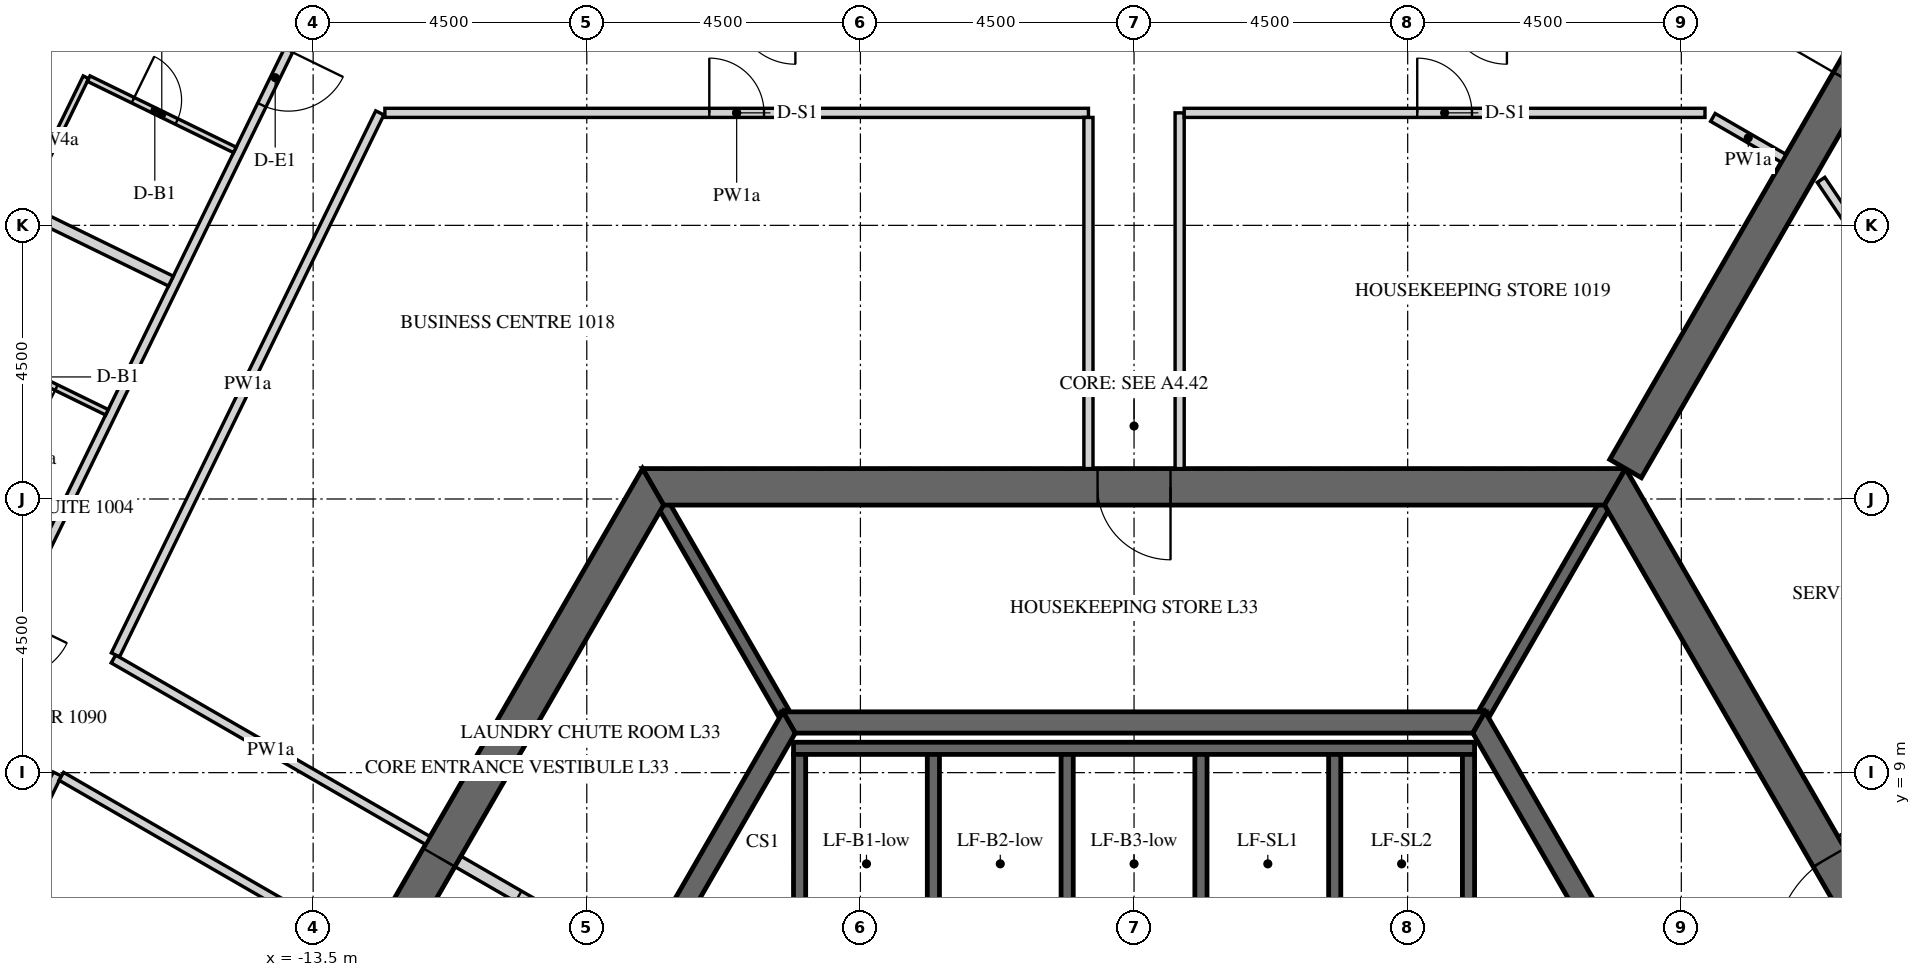
"""IFC4 building model, lengths in metres.
Left out: names, types, materials, properties, quantities, classifications, styles, units other than length and angle.
Written with IfcOpenShell. Run it as: python <this file> out.ifc"""

import sys

from ifc_helpers import new_model, si_unit, direction, frame, frame_2d, origin, place, context, subcontext, project, spatial, polyline, rectangle, outline, extrude, element, fill, save


model = new_model("IFC4")
c1 = context("Model", 3, precision=1e-05, world=origin(), true_north=direction((0.0, 1.0)))
c2 = subcontext(c1, "Body", "Model", "MODEL_VIEW")
j1 = project(units=[si_unit("LENGTHUNIT", "METRE"), si_unit("PLANEANGLEUNIT", "RADIAN")], contexts=[c1])
p1 = place(None, origin())
s1 = spatial("IfcSite", under=j1, at=p1, CompositionType="ELEMENT")
p2 = place(p1, origin())
s2 = spatial("IfcBuilding", under=s1, at=p2, CompositionType="ELEMENT")
p3 = place(p2, frame((0.0, 0.0, 142.8)))
s3 = spatial("IfcBuildingStorey", under=s2, at=p3, CompositionType="ELEMENT", Elevation=142.8)
p4 = place(p3, frame((-7.91, 13.7, -0.15), z_axis=(0.0, 0.0, 1.0), x_axis=(-0.499999880136, -0.866025472988, 0.0)))
e1 = element("IfcWall", 1, at=p4, inside=s3, PredefinedType="SHEAR", context=c2, shape_type="SweptSolid", body=[
    extrude(outline(polyline([(-0.173, -0.3), (15.993, -0.3), (15.646, 0.3), (0.173, 0.3), (-0.173, -0.3)])), origin(), (0.0, 0.0, 1.0), 3.75),
])
p5 = place(p4, frame((7.039, 0.0, 0.15)))
e2 = element("IfcOpeningElement", 2, at=p5, cuts=e1, PredefinedType="OPENING", context=c2, shape_type="SweptSolid", body=[
    extrude(rectangle(XDim=1.8, YDim=2.4, at=frame_2d((0.9, 1.2))), frame((0.0, 0.31, 0.0), z_axis=(0.0, -1.0, 0.0), x_axis=(1.0, 0.0, 0.0)), (0.0, 0.0, 1.0), 0.62),
])
p6 = place(p3, frame((15.819, 0.0, -0.15), z_axis=(0.0, 0.0, 1.0), x_axis=(-0.499999880136, 0.866025472988, 0.0)))
e3 = element("IfcWall", 3, at=p6, inside=s3, PredefinedType="SHEAR", context=c2, shape_type="SweptSolid", body=[
    extrude(outline(polyline([(-0.173, -0.3), (15.993, -0.3), (15.646, 0.3), (0.173, 0.3), (-0.173, -0.3)])), origin(), (0.0, 0.0, 1.0), 3.75),
])
p7 = place(p6, frame((6.981, 0.0, 0.15)))
e4 = element("IfcOpeningElement", 4, at=p7, cuts=e3, PredefinedType="OPENING", context=c2, shape_type="SweptSolid", body=[
    extrude(rectangle(XDim=1.8, YDim=2.4, at=frame_2d((0.9, 1.2))), frame((0.0, 0.31, 0.0), z_axis=(0.0, -1.0, 0.0), x_axis=(1.0, 0.0, 0.0)), (0.0, 0.0, 1.0), 0.62),
])
p8 = place(p3, frame((7.91, 13.7, -0.15), z_axis=(0.0, 0.0, 1.0), x_axis=(-1.0, 0.0, 0.0)))
e5 = element("IfcWall", 5, at=p8, inside=s3, PredefinedType="SHEAR", context=c2, shape_type="SweptSolid", body=[
    extrude(outline(polyline([(-0.173, -0.3), (15.993, -0.3), (15.646, 0.3), (0.173, 0.3), (-0.173, -0.3)])), origin(), (0.0, 0.0, 1.0), 3.75),
])
p9 = place(p8, frame((7.31, 0.0, 0.15)))
e6 = element("IfcOpeningElement", 6, at=p9, cuts=e5, PredefinedType="OPENING", context=c2, shape_type="SweptSolid", body=[
    extrude(rectangle(XDim=1.2, YDim=2.4, at=frame_2d((0.6, 1.2))), frame((0.0, 0.31, 0.0), z_axis=(0.0, -1.0, 0.0), x_axis=(1.0, 0.0, 0.0)), (0.0, 0.0, 1.0), 0.62),
])
p10 = place(p3, frame((8.083, 14.0, -0.15), z_axis=(0.0, 0.0, 1.0), x_axis=(0.499997680643, 0.866026742862, 0.0)))
e7 = element("IfcWall", 7, at=p10, inside=s3, PredefinedType="SHEAR", context=c2, shape_type="SweptSolid", body=[
    extrude(rectangle(XDim=16.509, YDim=0.6, at=frame_2d((8.254, 0.0))), origin(), (0.0, 0.0, 1.0), 3.75),
])
p11 = place(p10, frame((7.354, 0.0, 0.15)))
e8 = element("IfcOpeningElement", 8, at=p11, cuts=e7, PredefinedType="OPENING", context=c2, shape_type="SweptSolid", body=[
    extrude(rectangle(XDim=1.8, YDim=2.4, at=frame_2d((0.9, 1.2))), frame((0.0, 0.31, 0.0), z_axis=(0.0, -1.0, 0.0), x_axis=(1.0, 0.0, 0.0)), (0.0, 0.0, 1.0), 0.62),
])
p12 = place(p3, frame((-5.673, 9.825, -0.15), z_axis=(0.0, 0.0, 1.0), x_axis=(-0.499995046907, -0.866028263435, 0.0)))
e9 = element("IfcWall", 9, at=p12, inside=s3, PredefinedType="SHEAR", context=c2, shape_type="SweptSolid", body=[
    extrude(outline(polyline([(-0.101, -0.175), (11.446, -0.175), (11.244, 0.175), (0.101, 0.175), (-0.101, -0.175)])), origin(), (0.0, 0.0, 1.0), 3.75),
])
p13 = place(p12, frame((4.801, 0.0, 0.15)))
e10 = element("IfcOpeningElement", 10, at=p13, cuts=e9, PredefinedType="OPENING", context=c2, shape_type="SweptSolid", body=[
    extrude(rectangle(XDim=1.8, YDim=2.4, at=frame_2d((0.9, 1.2))), frame((0.0, 0.185, 0.0), z_axis=(0.0, -1.0, 0.0), x_axis=(1.0, 0.0, 0.0)), (0.0, 0.0, 1.0), 0.37),
])
p14 = place(p3, frame((11.345, 0.0, -0.15), z_axis=(0.0, 0.0, 1.0), x_axis=(-0.499995046907, 0.866028263435, 0.0)))
e11 = element("IfcWall", 11, at=p14, inside=s3, PredefinedType="SHEAR", context=c2, shape_type="SweptSolid", body=[
    extrude(outline(polyline([(-0.101, -0.175), (11.446, -0.175), (11.244, 0.175), (0.101, 0.175), (-0.101, -0.175)])), origin(), (0.0, 0.0, 1.0), 3.75),
])
p15 = place(p14, frame((4.744, 0.0, 0.15)))
e12 = element("IfcOpeningElement", 12, at=p15, cuts=e11, PredefinedType="OPENING", context=c2, shape_type="SweptSolid", body=[
    extrude(rectangle(XDim=1.8, YDim=2.4, at=frame_2d((0.9, 1.2))), frame((0.0, 0.185, 0.0), z_axis=(0.0, -1.0, 0.0), x_axis=(1.0, 0.0, 0.0)), (0.0, 0.0, 1.0), 0.37),
])
p16 = place(p3, frame((5.673, 9.825, -0.15), z_axis=(0.0, 0.0, 1.0), x_axis=(-1.0, 0.0, 0.0)))
e13 = element("IfcWall", 13, at=p16, inside=s3, PredefinedType="SHEAR", context=c2, shape_type="SweptSolid", body=[
    extrude(outline(polyline([(-0.101, -0.175), (11.446, -0.175), (11.244, 0.175), (0.101, 0.175), (-0.101, -0.175)])), origin(), (0.0, 0.0, 1.0), 3.75),
])
p17 = place(p3, frame((-5.6, 9.4, -0.25), z_axis=(0.0, 0.0, 1.0), x_axis=(1.0, 0.0, 0.0)))
e14 = element("IfcWall", 14, at=p17, inside=s3, PredefinedType="SHEAR", context=c2, shape_type="SweptSolid", body=[
    extrude(rectangle(XDim=11.2, YDim=0.2, at=frame_2d((5.6, 0.0))), origin(), (0.0, 0.0, 1.0), 3.9),
])
for number, where, z_axis, x_axis in (
    (15, (-5.5, 6.4, -0.25), (0.0, 0.0, 1.0), (0.0, 1.0, 0.0)),
    (16, (-3.3, 6.4, -0.25), (0.0, 0.0, 1.0), (0.0, 1.0, 0.0)),
    (17, (-1.1, 6.4, -0.25), (0.0, 0.0, 1.0), (0.0, 1.0, 0.0)),
    (18, (1.1, 6.4, -0.25), (0.0, 0.0, 1.0), (0.0, 1.0, 0.0)),
    (19, (3.3, 6.4, -0.25), (0.0, 0.0, 1.0), (0.0, 1.0, 0.0)),
    (20, (5.5, 6.4, -0.25), (0.0, 0.0, 1.0), (0.0, 1.0, 0.0)),
):
    element("IfcWall", number, at=place(p3, frame(where, z_axis=z_axis, x_axis=x_axis)), inside=s3, PredefinedType="SHEAR", context=c2, shape_type="SweptSolid", body=[
        extrude(rectangle(XDim=2.9, YDim=0.2, at=frame_2d((1.45, 0.0))), origin(), (0.0, 0.0, 1.0), 3.9),
    ])
for number, where, z_axis, x_axis in (
    (21, (5.773, 10.0, -0.15), (0.0, 0.0, 1.0), (0.5, 0.866, 0.0)),
    (22, (-5.773, 10.0, -0.15), (0.0, 0.0, 1.0), (-0.5, 0.866, 0.0)),
):
    element("IfcWall", number, at=place(p3, frame(where, z_axis=z_axis, x_axis=x_axis)), inside=s3, PredefinedType="SHEAR", context=c2, shape_type="SweptSolid", body=[
        extrude(rectangle(XDim=3.926, YDim=0.2, at=frame_2d((1.963, 0.0))), origin(), (0.0, 0.0, 1.0), 3.75),
    ])
p18 = place(p3, frame((-8.175, 5.841, 0.0), z_axis=(0.0, 0.0, 1.0), x_axis=(-0.866020560687, 0.500008388397, 0.0)))
e23 = element("IfcWall", 23, at=p18, inside=s3, PredefinedType="PARTITIONING", context=c2, shape_type="SweptSolid", body=[
    extrude(rectangle(XDim=3.4, YDim=0.2, at=frame_2d((1.7, 0.0))), origin(), (0.0, 0.0, 1.0), 3.65),
])
p19 = place(p18, frame((1.35, 0.0, 0.0)))
e24 = element("IfcOpeningElement", 24, at=p19, cuts=e23, PredefinedType="OPENING", context=c2, shape_type="SweptSolid", body=[
    extrude(rectangle(XDim=0.9, YDim=2.1, at=frame_2d((0.45, 1.05))), frame((0.0, 0.11, 0.0), z_axis=(0.0, -1.0, 0.0), x_axis=(1.0, 0.0, 0.0)), (0.0, 0.0, 1.0), 0.22),
])
p20 = place(p3, frame((-13.565, 21.575, 0.0), z_axis=(0.0, 0.0, 1.0), x_axis=(-0.438378393111, -0.898790511996, 0.0)))
e25 = element("IfcWall", 25, at=p20, inside=s3, PredefinedType="PARTITIONING", context=c2, shape_type="SweptSolid", body=[
    extrude(rectangle(XDim=21.584, YDim=0.15, at=frame_2d((10.792, 0.0))), origin(), (0.0, 0.0, 1.0), 2.838),
])
p21 = place(p20, frame((0.775, 0.0, 0.0)))
e26 = element("IfcOpeningElement", 26, at=p21, cuts=e25, PredefinedType="OPENING", context=c2, shape_type="SweptSolid", body=[
    extrude(rectangle(XDim=1.0, YDim=2.1, at=frame_2d((0.5, 1.05))), frame((0.0, 0.085, 0.0), z_axis=(0.0, -1.0, 0.0), x_axis=(1.0, 0.0, 0.0)), (0.0, 0.0, 1.0), 0.17),
])
p22 = place(p20, frame((11.134, 0.0, 0.0)))
e27 = element("IfcOpeningElement", 27, at=p22, cuts=e25, PredefinedType="OPENING", context=c2, shape_type="SweptSolid", body=[
    extrude(rectangle(XDim=1.0, YDim=2.1, at=frame_2d((0.5, 1.05))), frame((0.0, 0.085, 0.0), z_axis=(0.0, -1.0, 0.0), x_axis=(1.0, 0.0, 0.0)), (0.0, 0.0, 1.0), 0.17),
])
p23 = place(p20, frame((16.801, 0.0, 0.0)))
e28 = element("IfcOpeningElement", 28, at=p23, cuts=e25, PredefinedType="OPENING", context=c2, shape_type="SweptSolid", body=[
    extrude(rectangle(XDim=1.0, YDim=2.1, at=frame_2d((0.5, 1.05))), frame((0.0, 0.085, 0.0), z_axis=(0.0, -1.0, 0.0), x_axis=(1.0, 0.0, 0.0)), (0.0, 0.0, 1.0), 0.17),
])
p24 = place(p3, frame((-11.614, 7.884, 0.0), z_axis=(0.0, 0.0, 1.0), x_axis=(-0.866017375886, 0.50001390447, 0.0)))
e29 = element("IfcWall", 29, at=p24, inside=s3, PredefinedType="PARTITIONING", context=c2, shape_type="SweptSolid", body=[
    extrude(rectangle(XDim=5.97, YDim=0.15, at=frame_2d((2.985, 0.0))), origin(), (0.0, 0.0, 1.0), 2.838),
])
p25 = place(p3, frame((-16.751, 10.937, 0.0), z_axis=(0.0, 0.0, 1.0), x_axis=(0.438378523504, 0.898790448397, 0.0)))
e30 = element("IfcWall", 30, at=p25, inside=s3, PredefinedType="PARTITIONING", context=c2, shape_type="SweptSolid", body=[
    extrude(rectangle(XDim=9.917, YDim=0.15, at=frame_2d((4.958, 0.0))), origin(), (0.0, 0.0, 1.0), 2.838),
])
p26 = place(p3, frame((-12.32, 19.85, 0.0), z_axis=(0.0, 0.0, 1.0), x_axis=(1.0, 0.0, 0.0)))
e31 = element("IfcWall", 31, at=p26, inside=s3, PredefinedType="PARTITIONING", context=c2, shape_type="SweptSolid", body=[
    extrude(rectangle(XDim=11.57, YDim=0.15, at=frame_2d((5.785, 0.0))), origin(), (0.0, 0.0, 1.0), 2.838),
])
p27 = place(p26, frame((5.335, 0.0, 0.0)))
e32 = element("IfcOpeningElement", 32, at=p27, cuts=e31, PredefinedType="OPENING", context=c2, shape_type="SweptSolid", body=[
    extrude(rectangle(XDim=0.9, YDim=2.1, at=frame_2d((0.45, 1.05))), frame((0.0, 0.085, 0.0), z_axis=(0.0, -1.0, 0.0), x_axis=(1.0, 0.0, 0.0)), (0.0, 0.0, 1.0), 0.17),
])
p28 = place(p3, frame((-0.75, 19.775, 0.0), z_axis=(0.0, 0.0, 1.0), x_axis=(0.0, -1.0, 0.0)))
e33 = element("IfcWall", 33, at=p28, inside=s3, PredefinedType="PARTITIONING", context=c2, shape_type="SweptSolid", body=[
    extrude(rectangle(XDim=5.775, YDim=0.15, at=frame_2d((2.887, 0.0))), origin(), (0.0, 0.0, 1.0), 2.838),
])
p29 = place(p3, frame((0.75, 14.0, 0.0), z_axis=(0.0, 0.0, 1.0), x_axis=(0.0, 1.0, 0.0)))
e34 = element("IfcWall", 34, at=p29, inside=s3, PredefinedType="PARTITIONING", context=c2, shape_type="SweptSolid", body=[
    extrude(rectangle(XDim=5.85, YDim=0.15, at=frame_2d((2.925, 0.0))), origin(), (0.0, 0.0, 1.0), 2.838),
])
p30 = place(p3, frame((0.825, 19.85, 0.0), z_axis=(0.0, 0.0, 1.0), x_axis=(1.0, 0.0, 0.0)))
e35 = element("IfcWall", 35, at=p30, inside=s3, PredefinedType="PARTITIONING", context=c2, shape_type="SweptSolid", body=[
    extrude(rectangle(XDim=8.564, YDim=0.15, at=frame_2d((4.282, 0.0))), origin(), (0.0, 0.0, 1.0), 2.838),
])
p31 = place(p30, frame((3.832, 0.0, 0.0)))
e36 = element("IfcOpeningElement", 36, at=p31, cuts=e35, PredefinedType="OPENING", context=c2, shape_type="SweptSolid", body=[
    extrude(rectangle(XDim=0.9, YDim=2.1, at=frame_2d((0.45, 1.05))), frame((0.0, 0.085, 0.0), z_axis=(0.0, -1.0, 0.0), x_axis=(1.0, 0.0, 0.0)), (0.0, 0.0, 1.0), 0.17),
])
p32 = place(p3, frame((9.519, 19.775, 0.0), z_axis=(0.0, 0.0, 1.0), x_axis=(0.866043397086, -0.499968833392, 0.0)))
e37 = element("IfcWall", 37, at=p32, inside=s3, PredefinedType="PARTITIONING", context=c2, shape_type="SweptSolid", body=[
    extrude(rectangle(XDim=1.344, YDim=0.15, at=frame_2d((0.672, 0.0))), origin(), (0.0, 0.0, 1.0), 2.838),
])
p33 = place(p3, frame((-21.885, 0.41, 0.0), z_axis=(0.0, 0.0, 1.0), x_axis=(0.43837064471, 0.898794291179, 0.0)))
e38 = element("IfcWall", 38, at=p33, inside=s3, PredefinedType="PARTITIONING", context=c2, shape_type="SweptSolid", body=[
    extrude(rectangle(XDim=9.532, YDim=0.15, at=frame_2d((4.766, 0.0))), origin(), (0.0, 0.0, 1.0), 2.838),
])
p34 = place(p33, frame((4.316, 0.0, 0.0)))
e39 = element("IfcOpeningElement", 39, at=p34, cuts=e38, PredefinedType="OPENING", context=c2, shape_type="SweptSolid", body=[
    extrude(rectangle(XDim=0.9, YDim=2.1, at=frame_2d((0.45, 1.05))), frame((0.0, 0.085, 0.0), z_axis=(0.0, -1.0, 0.0), x_axis=(1.0, 0.0, 0.0)), (0.0, 0.0, 1.0), 0.17),
])
p35 = place(p3, frame((-17.642, 8.94, 0.0), z_axis=(0.0, 0.0, 1.0), x_axis=(0.866017948234, -0.500012913169, 0.0)))
e40 = element("IfcWall", 40, at=p35, inside=s3, PredefinedType="PARTITIONING", context=c2, shape_type="SweptSolid", body=[
    extrude(rectangle(XDim=5.748, YDim=0.15, at=frame_2d((2.874, 0.0))), origin(), (0.0, 0.0, 1.0), 2.838),
])
p36 = place(p3, frame((11.298, 18.748, 0.0), z_axis=(0.0, 0.0, 1.0), x_axis=(0.559198234291, -0.829033976847, 0.0)))
e41 = element("IfcWall", 41, at=p36, inside=s3, PredefinedType="PARTITIONING", context=c2, shape_type="SweptSolid", body=[
    extrude(rectangle(XDim=9.59, YDim=0.15, at=frame_2d((4.795, 0.0))), origin(), (0.0, 0.0, 1.0), 2.838),
])
p37 = place(p36, frame((4.345, 0.0, 0.0)))
e42 = element("IfcOpeningElement", 42, at=p37, cuts=e41, PredefinedType="OPENING", context=c2, shape_type="SweptSolid", body=[
    extrude(rectangle(XDim=0.9, YDim=2.1, at=frame_2d((0.45, 1.05))), frame((0.0, 0.085, 0.0), z_axis=(0.0, -1.0, 0.0), x_axis=(1.0, 0.0, 0.0)), (0.0, 0.0, 1.0), 0.17),
])
p38 = place(p3, frame((16.595, 10.76, 0.0), z_axis=(0.0, 0.0, 1.0), x_axis=(-0.866019477104, -0.500010265171, 0.0)))
e43 = element("IfcWall", 43, at=p38, inside=s3, PredefinedType="PARTITIONING", context=c2, shape_type="SweptSolid", body=[
    extrude(rectangle(XDim=5.752, YDim=0.15, at=frame_2d((2.876, 0.0))), origin(), (0.0, 0.0, 1.0), 2.838),
])
p39 = place(p3, frame((-18.249, 18.359, 0.0), z_axis=(0.0, 0.0, 1.0), x_axis=(0.438313261974, 0.898822276303, 0.0)))
e44 = element("IfcWall", 44, at=p39, inside=s3, PredefinedType="PARTITIONING", context=c2, shape_type="SweptSolid", body=[
    extrude(rectangle(XDim=2.31, YDim=0.1, at=frame_2d((1.155, 0.0))), origin(), (0.0, 0.0, 1.0), 2.838),
])
p40 = place(p3, frame((-17.191, 20.413, 0.0), z_axis=(0.0, 0.0, 1.0), x_axis=(0.898800897694, -0.438357099068, 0.0)))
e45 = element("IfcWall", 45, at=p40, inside=s3, PredefinedType="PARTITIONING", context=c2, shape_type="SweptSolid", body=[
    extrude(rectangle(XDim=2.675, YDim=0.1, at=frame_2d((1.337, 0.0))), origin(), (0.0, 0.0, 1.0), 2.838),
])
p41 = place(p40, frame((0.81, 0.0, 0.0)))
e46 = element("IfcOpeningElement", 46, at=p41, cuts=e45, PredefinedType="OPENING", context=c2, shape_type="SweptSolid", body=[
    extrude(rectangle(XDim=0.8, YDim=2.1, at=frame_2d((0.4, 1.05))), frame((0.0, 0.06, 0.0), z_axis=(0.0, -1.0, 0.0), x_axis=(1.0, 0.0, 0.0)), (0.0, 0.0, 1.0), 0.12),
])
p42 = place(p3, frame((-22.782, 20.47, 0.0), z_axis=(0.0, 0.0, 1.0), x_axis=(0.898789402655, -0.438380667542, 0.0)))
e47 = element("IfcWall", 47, at=p42, inside=s3, PredefinedType="PARTITIONING", context=c2, shape_type="SweptSolid", body=[
    extrude(rectangle(XDim=7.725, YDim=0.18, at=frame_2d((3.862, 0.0))), origin(), (0.0, 0.0, 1.0), 2.838),
])
p43 = place(p3, frame((-16.891, 14.926, 0.0), z_axis=(0.0, 0.0, 1.0), x_axis=(-0.898791692788, 0.43837597217, 0.0)))
e48 = element("IfcWall", 48, at=p43, inside=s3, PredefinedType="PARTITIONING", context=c2, shape_type="SweptSolid", body=[
    extrude(rectangle(XDim=2.725, YDim=0.1, at=frame_2d((1.363, 0.0))), origin(), (0.0, 0.0, 1.0), 2.838),
])
p44 = place(p43, frame((0.925, 0.0, 0.0)))
e49 = element("IfcOpeningElement", 49, at=p44, cuts=e48, PredefinedType="OPENING", context=c2, shape_type="SweptSolid", body=[
    extrude(rectangle(XDim=0.8, YDim=2.1, at=frame_2d((0.4, 1.05))), frame((0.0, 0.06, 0.0), z_axis=(0.0, -1.0, 0.0), x_axis=(1.0, 0.0, 0.0)), (0.0, 0.0, 1.0), 0.12),
])
p45 = place(p5, origin())
e50 = element("IfcDoor", 50, at=p45, inside=s3, OperationType="DOUBLE_DOOR_SINGLE_SWING", PredefinedType="DOOR", context=c2, shape_type="SweptSolid", body=[
    extrude(rectangle(XDim=1.8, YDim=2.4, at=frame_2d((0.9, 1.2))), frame((0.0, 0.025, 0.0), z_axis=(0.0, -1.0, 0.0), x_axis=(1.0, 0.0, 0.0)), (0.0, 0.0, 1.0), 0.05),
])
fill(e2, e50)
p46 = place(p7, origin())
e51 = element("IfcDoor", 51, at=p46, inside=s3, OperationType="DOUBLE_DOOR_SINGLE_SWING", PredefinedType="DOOR", context=c2, shape_type="SweptSolid", body=[
    extrude(rectangle(XDim=1.8, YDim=2.4, at=frame_2d((0.9, 1.2))), frame((0.0, 0.025, 0.0), z_axis=(0.0, -1.0, 0.0), x_axis=(1.0, 0.0, 0.0)), (0.0, 0.0, 1.0), 0.05),
])
fill(e4, e51)
p47 = place(p9, origin())
e52 = element("IfcDoor", 52, at=p47, inside=s3, OperationType="SINGLE_SWING_LEFT", PredefinedType="DOOR", context=c2, shape_type="SweptSolid", body=[
    extrude(rectangle(XDim=1.2, YDim=2.4, at=frame_2d((0.6, 1.2))), frame((0.0, 0.025, 0.0), z_axis=(0.0, -1.0, 0.0), x_axis=(1.0, 0.0, 0.0)), (0.0, 0.0, 1.0), 0.05),
])
fill(e6, e52)
p48 = place(p19, origin())
e53 = element("IfcDoor", 53, at=p48, inside=s3, OperationType="SINGLE_SWING_LEFT", PredefinedType="DOOR", context=c2, shape_type="SweptSolid", body=[
    extrude(rectangle(XDim=0.9, YDim=2.1, at=frame_2d((0.45, 1.05))), frame((0.0, 0.025, 0.0), z_axis=(0.0, -1.0, 0.0), x_axis=(1.0, 0.0, 0.0)), (0.0, 0.0, 1.0), 0.05),
])
fill(e24, e53)
p49 = place(p21, origin())
e54 = element("IfcDoor", 54, at=p49, inside=s3, OperationType="SINGLE_SWING_RIGHT", PredefinedType="DOOR", context=c2, shape_type="SweptSolid", body=[
    extrude(rectangle(XDim=1.0, YDim=2.1, at=frame_2d((0.5, 1.05))), frame((0.0, 0.025, 0.0), z_axis=(0.0, -1.0, 0.0), x_axis=(1.0, 0.0, 0.0)), (0.0, 0.0, 1.0), 0.05),
])
fill(e26, e54)
p50 = place(p41, origin())
e55 = element("IfcDoor", 55, at=p50, inside=s3, OperationType="SINGLE_SWING_RIGHT", PredefinedType="DOOR", context=c2, shape_type="SweptSolid", body=[
    extrude(rectangle(XDim=0.8, YDim=2.1, at=frame_2d((0.4, 1.05))), frame((0.0, 0.025, 0.0), z_axis=(0.0, -1.0, 0.0), x_axis=(1.0, 0.0, 0.0)), (0.0, 0.0, 1.0), 0.05),
])
fill(e46, e55)
p51 = place(p44, origin())
e56 = element("IfcDoor", 56, at=p51, inside=s3, OperationType="SINGLE_SWING_RIGHT", PredefinedType="DOOR", context=c2, shape_type="SweptSolid", body=[
    extrude(rectangle(XDim=0.8, YDim=2.1, at=frame_2d((0.4, 1.05))), frame((0.0, 0.025, 0.0), z_axis=(0.0, -1.0, 0.0), x_axis=(1.0, 0.0, 0.0)), (0.0, 0.0, 1.0), 0.05),
])
fill(e49, e56)
p52 = place(p27, origin())
e57 = element("IfcDoor", 57, at=p52, inside=s3, OperationType="SINGLE_SWING_RIGHT", PredefinedType="DOOR", context=c2, shape_type="SweptSolid", body=[
    extrude(rectangle(XDim=0.9, YDim=2.1, at=frame_2d((0.45, 1.05))), frame((0.0, 0.025, 0.0), z_axis=(0.0, -1.0, 0.0), x_axis=(1.0, 0.0, 0.0)), (0.0, 0.0, 1.0), 0.05),
])
fill(e32, e57)
p53 = place(p31, origin())
e58 = element("IfcDoor", 58, at=p53, inside=s3, OperationType="SINGLE_SWING_RIGHT", PredefinedType="DOOR", context=c2, shape_type="SweptSolid", body=[
    extrude(rectangle(XDim=0.9, YDim=2.1, at=frame_2d((0.45, 1.05))), frame((0.0, 0.025, 0.0), z_axis=(0.0, -1.0, 0.0), x_axis=(1.0, 0.0, 0.0)), (0.0, 0.0, 1.0), 0.05),
])
fill(e36, e58)
save(model, sys.argv[1])
